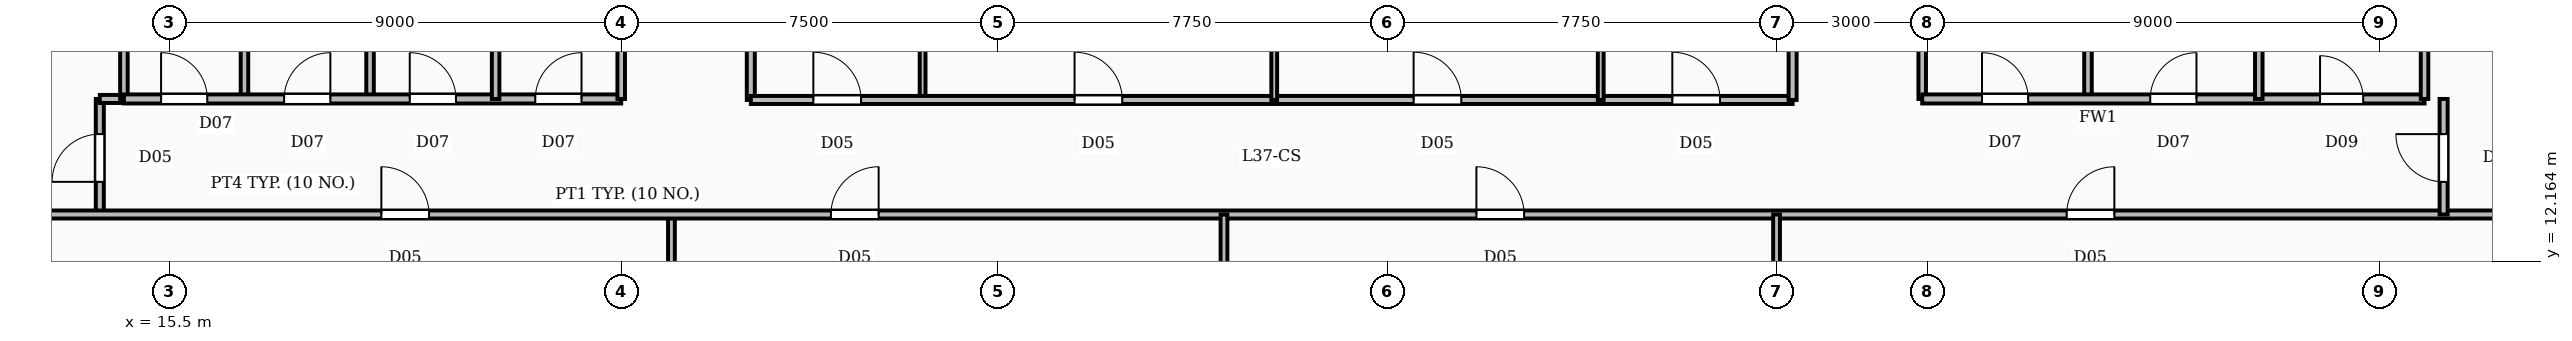
"""IFC4 building model, lengths in metres.
Left out: names, types, materials, properties, quantities, classifications, styles, units other than length and angle.
Written with IfcOpenShell. Run it as: python <this file> out.ifc"""

import sys

from ifc_helpers import new_model, si_unit, direction, frame, frame_2d, origin, place, context, subcontext, project, spatial, rectangle, extrude, element, fill, save


model = new_model("IFC4")
c1 = context("Model", 3, precision=1e-05, world=origin(), true_north=direction((0.0, 1.0)))
c2 = subcontext(c1, "Body", "Model", "MODEL_VIEW")
j1 = project(units=[si_unit("LENGTHUNIT", "METRE"), si_unit("PLANEANGLEUNIT", "RADIAN")], contexts=[c1])
p1 = place(None, origin())
s1 = spatial("IfcSite", under=j1, at=p1, CompositionType="ELEMENT")
p2 = place(p1, origin())
s2 = spatial("IfcBuilding", under=s1, at=p2, CompositionType="ELEMENT")
p3 = place(p2, frame((0.0, 0.0, 158.45)))
s3 = spatial("IfcBuildingStorey", under=s2, at=p3, CompositionType="ELEMENT", Elevation=158.45)
for number, where, z_axis, x_axis in (
    (1, (17.0, 15.4, 0.0), (0.0, 0.0, 1.0), (0.0, 1.0, 0.0)),
    (2, (19.5, 15.4, 0.0), (0.0, 0.0, 1.0), (0.0, 1.0, 0.0)),
    (3, (22.0, 15.4, 0.0), (0.0, 0.0, 1.0), (0.0, 1.0, 0.0)),
):
    element("IfcWall", number, at=place(p3, frame(where, z_axis=z_axis, x_axis=x_axis)), inside=s3, PredefinedType="PARTITIONING", context=c2, shape_type="SweptSolid", body=[
        extrude(rectangle(XDim=3.58, YDim=0.15, at=frame_2d((1.79, 0.0))), origin(), (0.0, 0.0, 1.0), 2.54),
    ])
p4 = place(p3, frame((14.6, 15.4, 0.0), z_axis=(0.0, 0.0, 1.0), x_axis=(1.0, 0.0, 0.0)))
e4 = element("IfcWall", 4, at=p4, inside=s3, PredefinedType="PARTITIONING", context=c2, shape_type="SweptSolid", body=[
    extrude(rectangle(XDim=9.9, YDim=0.18, at=frame_2d((4.95, 0.0))), origin(), (0.0, 0.0, 1.0), 2.54),
])
p5 = place(p4, frame((0.74, 0.0, 0.0)))
e5 = element("IfcOpeningElement", 5, at=p5, cuts=e4, PredefinedType="OPENING", context=c2, shape_type="SweptSolid", body=[
    extrude(rectangle(XDim=0.92, YDim=2.1, at=frame_2d((0.46, 1.05))), frame((0.0, 0.1, 0.0), z_axis=(0.0, -1.0, 0.0), x_axis=(1.0, 0.0, 0.0)), (0.0, 0.0, 1.0), 0.2),
])
p6 = place(p4, frame((3.19, 0.0, 0.0)))
e6 = element("IfcOpeningElement", 6, at=p6, cuts=e4, PredefinedType="OPENING", context=c2, shape_type="SweptSolid", body=[
    extrude(rectangle(XDim=0.92, YDim=2.1, at=frame_2d((0.46, 1.05))), frame((0.0, 0.1, 0.0), z_axis=(0.0, -1.0, 0.0), x_axis=(1.0, 0.0, 0.0)), (0.0, 0.0, 1.0), 0.2),
])
p7 = place(p4, frame((5.69, 0.0, 0.0)))
e7 = element("IfcOpeningElement", 7, at=p7, cuts=e4, PredefinedType="OPENING", context=c2, shape_type="SweptSolid", body=[
    extrude(rectangle(XDim=0.92, YDim=2.1, at=frame_2d((0.46, 1.05))), frame((0.0, 0.1, 0.0), z_axis=(0.0, -1.0, 0.0), x_axis=(1.0, 0.0, 0.0)), (0.0, 0.0, 1.0), 0.2),
])
p8 = place(p4, frame((8.19, 0.0, 0.0)))
e8 = element("IfcOpeningElement", 8, at=p8, cuts=e4, PredefinedType="OPENING", context=c2, shape_type="SweptSolid", body=[
    extrude(rectangle(XDim=0.92, YDim=2.1, at=frame_2d((0.46, 1.05))), frame((0.0, 0.1, 0.0), z_axis=(0.0, -1.0, 0.0), x_axis=(1.0, 0.0, 0.0)), (0.0, 0.0, 1.0), 0.2),
])
for number, where, z_axis, x_axis in (
    (9, (14.6, 15.4, 0.0), (0.0, 0.0, 1.0), (0.0, 1.0, 0.0)),
    (10, (24.5, 15.4, 0.0), (0.0, 0.0, 1.0), (0.0, 1.0, 0.0)),
    (11, (53.7, 15.4, 0.0), (0.0, 0.0, 1.0), (0.0, 1.0, 0.0)),
    (12, (57.1, 15.4, 0.0), (0.0, 0.0, 1.0), (0.0, 1.0, 0.0)),
):
    element("IfcWall", number, at=place(p3, frame(where, z_axis=z_axis, x_axis=x_axis)), inside=s3, PredefinedType="PARTITIONING", context=c2, shape_type="SweptSolid", body=[
        extrude(rectangle(XDim=3.58, YDim=0.15, at=frame_2d((1.79, 0.0))), origin(), (0.0, 0.0, 1.0), 2.54),
    ])
p9 = place(p3, frame((50.4, 15.4, 0.0), z_axis=(0.0, 0.0, 1.0), x_axis=(1.0, 0.0, 0.0)))
e13 = element("IfcWall", 13, at=p9, inside=s3, PredefinedType="SOLIDWALL", context=c2, shape_type="SweptSolid", body=[
    extrude(rectangle(XDim=10.0, YDim=0.18, at=frame_2d((5.0, 0.0))), origin(), (0.0, 0.0, 1.0), 2.54),
])
p10 = place(p9, frame((1.19, 0.0, 0.0)))
e14 = element("IfcOpeningElement", 14, at=p10, cuts=e13, PredefinedType="OPENING", context=c2, shape_type="SweptSolid", body=[
    extrude(rectangle(XDim=0.92, YDim=2.1, at=frame_2d((0.46, 1.05))), frame((0.0, 0.1, 0.0), z_axis=(0.0, -1.0, 0.0), x_axis=(1.0, 0.0, 0.0)), (0.0, 0.0, 1.0), 0.2),
])
p11 = place(p9, frame((4.54, 0.0, 0.0)))
e15 = element("IfcOpeningElement", 15, at=p11, cuts=e13, PredefinedType="OPENING", context=c2, shape_type="SweptSolid", body=[
    extrude(rectangle(XDim=0.92, YDim=2.1, at=frame_2d((0.46, 1.05))), frame((0.0, 0.1, 0.0), z_axis=(0.0, -1.0, 0.0), x_axis=(1.0, 0.0, 0.0)), (0.0, 0.0, 1.0), 0.2),
])
p12 = place(p9, frame((7.92, 0.0, 0.0)))
e16 = element("IfcOpeningElement", 16, at=p12, cuts=e13, PredefinedType="OPENING", context=c2, shape_type="SweptSolid", body=[
    extrude(rectangle(XDim=0.86, YDim=2.05, at=frame_2d((0.43, 1.025))), frame((0.0, 0.1, 0.0), z_axis=(0.0, -1.0, 0.0), x_axis=(1.0, 0.0, 0.0)), (0.0, 0.0, 1.0), 0.2),
])
for number, where, z_axis, x_axis in (
    (17, (50.4, 15.4, 0.0), (0.0, 0.0, 1.0), (0.0, 1.0, 0.0)),
    (18, (60.4, 15.4, 0.0), (0.0, 0.0, 1.0), (0.0, 1.0, 0.0)),
):
    element("IfcWall", number, at=place(p3, frame(where, z_axis=z_axis, x_axis=x_axis)), inside=s3, PredefinedType="PARTITIONING", context=c2, shape_type="SweptSolid", body=[
        extrude(rectangle(XDim=3.58, YDim=0.15, at=frame_2d((1.79, 0.0))), origin(), (0.0, 0.0, 1.0), 2.54),
    ])
p13 = place(p3, frame((25.5, 5.887, 0.0), z_axis=(0.0, 0.0, 1.0), x_axis=(0.0, 1.0, 0.0)))
e19 = element("IfcWall", 19, at=p13, inside=s3, PredefinedType="PARTITIONING", context=c2, shape_type="SweptSolid", body=[
    extrude(rectangle(XDim=7.213, YDim=0.135, at=frame_2d((3.606, 0.0))), origin(), (0.0, 0.0, 1.0), 2.54),
])
p14 = place(p3, frame((36.5, 5.791, 0.0), z_axis=(0.0, 0.0, 1.0), x_axis=(0.0, 1.0, 0.0)))
e20 = element("IfcWall", 20, at=p14, inside=s3, PredefinedType="PARTITIONING", context=c2, shape_type="SweptSolid", body=[
    extrude(rectangle(XDim=7.309, YDim=0.135, at=frame_2d((3.654, 0.0))), origin(), (0.0, 0.0, 1.0), 2.54),
])
p15 = place(p3, frame((47.5, 5.695, 0.0), z_axis=(0.0, 0.0, 1.0), x_axis=(0.0, 1.0, 0.0)))
e21 = element("IfcWall", 21, at=p15, inside=s3, PredefinedType="PARTITIONING", context=c2, shape_type="SweptSolid", body=[
    extrude(rectangle(XDim=7.405, YDim=0.135, at=frame_2d((3.702, 0.0))), origin(), (0.0, 0.0, 1.0), 2.54),
])
p16 = place(p3, frame((5.364, 13.1, 0.0), z_axis=(0.0, 0.0, 1.0), x_axis=(1.0, 0.0, 0.0)))
e22 = element("IfcWall", 22, at=p16, inside=s3, PredefinedType="PARTITIONING", context=c2, shape_type="SweptSolid", body=[
    extrude(rectangle(XDim=60.202, YDim=0.16, at=frame_2d((30.101, 0.0))), origin(), (0.0, 0.0, 1.0), 2.54),
])
p17 = place(p16, frame((14.361, 0.0, 0.0)))
e23 = element("IfcOpeningElement", 23, at=p17, cuts=e22, PredefinedType="OPENING", context=c2, shape_type="SweptSolid", body=[
    extrude(rectangle(XDim=0.95, YDim=2.15, at=frame_2d((0.475, 1.075))), frame((0.0, 0.09, 0.0), z_axis=(0.0, -1.0, 0.0), x_axis=(1.0, 0.0, 0.0)), (0.0, 0.0, 1.0), 0.18),
])
p18 = place(p16, frame((23.311, 0.0, 0.0)))
e24 = element("IfcOpeningElement", 24, at=p18, cuts=e22, PredefinedType="OPENING", context=c2, shape_type="SweptSolid", body=[
    extrude(rectangle(XDim=0.95, YDim=2.15, at=frame_2d((0.475, 1.075))), frame((0.0, 0.09, 0.0), z_axis=(0.0, -1.0, 0.0), x_axis=(1.0, 0.0, 0.0)), (0.0, 0.0, 1.0), 0.18),
])
p19 = place(p16, frame((36.161, 0.0, 0.0)))
e25 = element("IfcOpeningElement", 25, at=p19, cuts=e22, PredefinedType="OPENING", context=c2, shape_type="SweptSolid", body=[
    extrude(rectangle(XDim=0.95, YDim=2.15, at=frame_2d((0.475, 1.075))), frame((0.0, 0.09, 0.0), z_axis=(0.0, -1.0, 0.0), x_axis=(1.0, 0.0, 0.0)), (0.0, 0.0, 1.0), 0.18),
])
p20 = place(p16, frame((47.911, 0.0, 0.0)))
e26 = element("IfcOpeningElement", 26, at=p20, cuts=e22, PredefinedType="OPENING", context=c2, shape_type="SweptSolid", body=[
    extrude(rectangle(XDim=0.95, YDim=2.15, at=frame_2d((0.475, 1.075))), frame((0.0, 0.09, 0.0), z_axis=(0.0, -1.0, 0.0), x_axis=(1.0, 0.0, 0.0)), (0.0, 0.0, 1.0), 0.18),
])
for number, where, z_axis, x_axis in (
    (27, (30.5, 15.38, 0.0), (0.0, 0.0, 1.0), (0.0, 1.0, 0.0)),
    (28, (37.5, 15.38, 0.0), (0.0, 0.0, 1.0), (0.0, 1.0, 0.0)),
    (29, (44.0, 15.38, 0.0), (0.0, 0.0, 1.0), (0.0, 1.0, 0.0)),
):
    element("IfcWall", number, at=place(p3, frame(where, z_axis=z_axis, x_axis=x_axis)), inside=s3, PredefinedType="PARTITIONING", context=c2, shape_type="SweptSolid", body=[
        extrude(rectangle(XDim=20.6, YDim=0.115, at=frame_2d((10.3, 0.0))), origin(), (0.0, 0.0, 1.0), 2.54),
    ])
p21 = place(p3, frame((27.08, 15.38, 0.0), z_axis=(0.0, 0.0, 1.0), x_axis=(1.0, 0.0, 0.0)))
e30 = element("IfcWall", 30, at=p21, inside=s3, PredefinedType="PARTITIONING", context=c2, shape_type="SweptSolid", body=[
    extrude(rectangle(XDim=20.74, YDim=0.16, at=frame_2d((10.37, 0.0))), origin(), (0.0, 0.0, 1.0), 2.54),
])
p22 = place(p21, frame((1.245, 0.0, 0.0)))
e31 = element("IfcOpeningElement", 31, at=p22, cuts=e30, PredefinedType="OPENING", context=c2, shape_type="SweptSolid", body=[
    extrude(rectangle(XDim=0.95, YDim=2.15, at=frame_2d((0.475, 1.075))), frame((0.0, 0.09, 0.0), z_axis=(0.0, -1.0, 0.0), x_axis=(1.0, 0.0, 0.0)), (0.0, 0.0, 1.0), 0.18),
])
p23 = place(p21, frame((6.445, 0.0, 0.0)))
e32 = element("IfcOpeningElement", 32, at=p23, cuts=e30, PredefinedType="OPENING", context=c2, shape_type="SweptSolid", body=[
    extrude(rectangle(XDim=0.95, YDim=2.15, at=frame_2d((0.475, 1.075))), frame((0.0, 0.09, 0.0), z_axis=(0.0, -1.0, 0.0), x_axis=(1.0, 0.0, 0.0)), (0.0, 0.0, 1.0), 0.18),
])
p24 = place(p21, frame((13.195, 0.0, 0.0)))
e33 = element("IfcOpeningElement", 33, at=p24, cuts=e30, PredefinedType="OPENING", context=c2, shape_type="SweptSolid", body=[
    extrude(rectangle(XDim=0.95, YDim=2.15, at=frame_2d((0.475, 1.075))), frame((0.0, 0.09, 0.0), z_axis=(0.0, -1.0, 0.0), x_axis=(1.0, 0.0, 0.0)), (0.0, 0.0, 1.0), 0.18),
])
p25 = place(p21, frame((18.345, 0.0, 0.0)))
e34 = element("IfcOpeningElement", 34, at=p25, cuts=e30, PredefinedType="OPENING", context=c2, shape_type="SweptSolid", body=[
    extrude(rectangle(XDim=0.95, YDim=2.15, at=frame_2d((0.475, 1.075))), frame((0.0, 0.09, 0.0), z_axis=(0.0, -1.0, 0.0), x_axis=(1.0, 0.0, 0.0)), (0.0, 0.0, 1.0), 0.18),
])
for number, where, z_axis, x_axis in (
    (35, (27.08, 15.38, 0.0), (0.0, 0.0, 1.0), (0.0, 1.0, 0.0)),
    (36, (47.82, 15.38, 0.0), (0.0, 0.0, 1.0), (0.0, 1.0, 0.0)),
):
    element("IfcWall", number, at=place(p3, frame(where, z_axis=z_axis, x_axis=x_axis)), inside=s3, PredefinedType="PARTITIONING", context=c2, shape_type="SweptSolid", body=[
        extrude(rectangle(XDim=20.6, YDim=0.16, at=frame_2d((10.3, 0.0))), origin(), (0.0, 0.0, 1.0), 2.54),
    ])
p26 = place(p3, frame((14.12, 13.1, 0.0), z_axis=(0.0, 0.0, 1.0), x_axis=(0.0, 1.0, 0.0)))
e37 = element("IfcWall", 37, at=p26, inside=s3, PredefinedType="PARTITIONING", context=c2, shape_type="SweptSolid", body=[
    extrude(rectangle(XDim=2.3, YDim=0.16, at=frame_2d((1.15, 0.0))), origin(), (0.0, 0.0, 1.0), 2.54),
])
p27 = place(p26, frame((0.65, 0.0, 0.0)))
e38 = element("IfcOpeningElement", 38, at=p27, cuts=e37, PredefinedType="OPENING", context=c2, shape_type="SweptSolid", body=[
    extrude(rectangle(XDim=0.95, YDim=2.15, at=frame_2d((0.475, 1.075))), frame((0.0, 0.09, 0.0), z_axis=(0.0, -1.0, 0.0), x_axis=(1.0, 0.0, 0.0)), (0.0, 0.0, 1.0), 0.18),
])
p28 = place(p3, frame((14.12, 15.4, 0.0), z_axis=(0.0, 0.0, 1.0), x_axis=(1.0, 0.0, 0.0)))
e39 = element("IfcWall", 39, at=p28, inside=s3, PredefinedType="PARTITIONING", context=c2, shape_type="SweptSolid", body=[
    extrude(rectangle(XDim=0.5, YDim=0.16, at=frame_2d((0.25, 0.0))), origin(), (0.0, 0.0, 1.0), 2.54),
])
p29 = place(p3, frame((60.78, 13.1, 0.0), z_axis=(0.0, 0.0, 1.0), x_axis=(0.0, 1.0, 0.0)))
e40 = element("IfcWall", 40, at=p29, inside=s3, PredefinedType="PARTITIONING", context=c2, shape_type="SweptSolid", body=[
    extrude(rectangle(XDim=2.3, YDim=0.16, at=frame_2d((1.15, 0.0))), origin(), (0.0, 0.0, 1.0), 2.54),
])
p30 = place(p29, frame((0.65, 0.0, 0.0)))
e41 = element("IfcOpeningElement", 41, at=p30, cuts=e40, PredefinedType="OPENING", context=c2, shape_type="SweptSolid", body=[
    extrude(rectangle(XDim=0.95, YDim=2.15, at=frame_2d((0.475, 1.075))), frame((0.0, 0.09, 0.0), z_axis=(0.0, -1.0, 0.0), x_axis=(1.0, 0.0, 0.0)), (0.0, 0.0, 1.0), 0.18),
])
p31 = place(p5, origin())
e42 = element("IfcDoor", 42, at=p31, inside=s3, OperationType="SINGLE_SWING_LEFT", PredefinedType="DOOR", context=c2, shape_type="SweptSolid", body=[
    extrude(rectangle(XDim=0.92, YDim=2.1, at=frame_2d((0.46, 1.05))), frame((0.0, 0.025, 0.0), z_axis=(0.0, -1.0, 0.0), x_axis=(1.0, 0.0, 0.0)), (0.0, 0.0, 1.0), 0.05),
])
fill(e5, e42)
p32 = place(p6, origin())
e43 = element("IfcDoor", 43, at=p32, inside=s3, OperationType="SINGLE_SWING_RIGHT", PredefinedType="DOOR", context=c2, shape_type="SweptSolid", body=[
    extrude(rectangle(XDim=0.92, YDim=2.1, at=frame_2d((0.46, 1.05))), frame((0.0, 0.025, 0.0), z_axis=(0.0, -1.0, 0.0), x_axis=(1.0, 0.0, 0.0)), (0.0, 0.0, 1.0), 0.05),
])
fill(e6, e43)
p33 = place(p7, origin())
e44 = element("IfcDoor", 44, at=p33, inside=s3, OperationType="SINGLE_SWING_LEFT", PredefinedType="DOOR", context=c2, shape_type="SweptSolid", body=[
    extrude(rectangle(XDim=0.92, YDim=2.1, at=frame_2d((0.46, 1.05))), frame((0.0, 0.025, 0.0), z_axis=(0.0, -1.0, 0.0), x_axis=(1.0, 0.0, 0.0)), (0.0, 0.0, 1.0), 0.05),
])
fill(e7, e44)
p34 = place(p8, origin())
e45 = element("IfcDoor", 45, at=p34, inside=s3, OperationType="SINGLE_SWING_RIGHT", PredefinedType="DOOR", context=c2, shape_type="SweptSolid", body=[
    extrude(rectangle(XDim=0.92, YDim=2.1, at=frame_2d((0.46, 1.05))), frame((0.0, 0.025, 0.0), z_axis=(0.0, -1.0, 0.0), x_axis=(1.0, 0.0, 0.0)), (0.0, 0.0, 1.0), 0.05),
])
fill(e8, e45)
p35 = place(p10, origin())
e46 = element("IfcDoor", 46, at=p35, inside=s3, OperationType="SINGLE_SWING_LEFT", PredefinedType="DOOR", context=c2, shape_type="SweptSolid", body=[
    extrude(rectangle(XDim=0.92, YDim=2.1, at=frame_2d((0.46, 1.05))), frame((0.0, 0.025, 0.0), z_axis=(0.0, -1.0, 0.0), x_axis=(1.0, 0.0, 0.0)), (0.0, 0.0, 1.0), 0.05),
])
fill(e14, e46)
p36 = place(p11, origin())
e47 = element("IfcDoor", 47, at=p36, inside=s3, OperationType="SINGLE_SWING_RIGHT", PredefinedType="DOOR", context=c2, shape_type="SweptSolid", body=[
    extrude(rectangle(XDim=0.92, YDim=2.1, at=frame_2d((0.46, 1.05))), frame((0.0, 0.025, 0.0), z_axis=(0.0, -1.0, 0.0), x_axis=(1.0, 0.0, 0.0)), (0.0, 0.0, 1.0), 0.05),
])
fill(e15, e47)
p37 = place(p12, origin())
e48 = element("IfcDoor", 48, at=p37, inside=s3, OperationType="SINGLE_SWING_LEFT", PredefinedType="DOOR", context=c2, shape_type="SweptSolid", body=[
    extrude(rectangle(XDim=0.86, YDim=2.05, at=frame_2d((0.43, 1.025))), frame((0.0, 0.025, 0.0), z_axis=(0.0, -1.0, 0.0), x_axis=(1.0, 0.0, 0.0)), (0.0, 0.0, 1.0), 0.05),
])
fill(e16, e48)
p38 = place(p17, origin())
e49 = element("IfcDoor", 49, at=p38, inside=s3, OperationType="SINGLE_SWING_LEFT", PredefinedType="DOOR", context=c2, shape_type="SweptSolid", body=[
    extrude(rectangle(XDim=0.95, YDim=2.15, at=frame_2d((0.475, 1.075))), frame((0.0, 0.025, 0.0), z_axis=(0.0, -1.0, 0.0), x_axis=(1.0, 0.0, 0.0)), (0.0, 0.0, 1.0), 0.05),
])
fill(e23, e49)
p39 = place(p18, origin())
e50 = element("IfcDoor", 50, at=p39, inside=s3, OperationType="SINGLE_SWING_RIGHT", PredefinedType="DOOR", context=c2, shape_type="SweptSolid", body=[
    extrude(rectangle(XDim=0.95, YDim=2.15, at=frame_2d((0.475, 1.075))), frame((0.0, 0.025, 0.0), z_axis=(0.0, -1.0, 0.0), x_axis=(1.0, 0.0, 0.0)), (0.0, 0.0, 1.0), 0.05),
])
fill(e24, e50)
p40 = place(p19, origin())
e51 = element("IfcDoor", 51, at=p40, inside=s3, OperationType="SINGLE_SWING_LEFT", PredefinedType="DOOR", context=c2, shape_type="SweptSolid", body=[
    extrude(rectangle(XDim=0.95, YDim=2.15, at=frame_2d((0.475, 1.075))), frame((0.0, 0.025, 0.0), z_axis=(0.0, -1.0, 0.0), x_axis=(1.0, 0.0, 0.0)), (0.0, 0.0, 1.0), 0.05),
])
fill(e25, e51)
p41 = place(p20, origin())
e52 = element("IfcDoor", 52, at=p41, inside=s3, OperationType="SINGLE_SWING_RIGHT", PredefinedType="DOOR", context=c2, shape_type="SweptSolid", body=[
    extrude(rectangle(XDim=0.95, YDim=2.15, at=frame_2d((0.475, 1.075))), frame((0.0, 0.025, 0.0), z_axis=(0.0, -1.0, 0.0), x_axis=(1.0, 0.0, 0.0)), (0.0, 0.0, 1.0), 0.05),
])
fill(e26, e52)
p42 = place(p22, origin())
e53 = element("IfcDoor", 53, at=p42, inside=s3, OperationType="SINGLE_SWING_LEFT", PredefinedType="DOOR", context=c2, shape_type="SweptSolid", body=[
    extrude(rectangle(XDim=0.95, YDim=2.15, at=frame_2d((0.475, 1.075))), frame((0.0, 0.025, 0.0), z_axis=(0.0, -1.0, 0.0), x_axis=(1.0, 0.0, 0.0)), (0.0, 0.0, 1.0), 0.05),
])
fill(e31, e53)
p43 = place(p23, origin())
e54 = element("IfcDoor", 54, at=p43, inside=s3, OperationType="SINGLE_SWING_LEFT", PredefinedType="DOOR", context=c2, shape_type="SweptSolid", body=[
    extrude(rectangle(XDim=0.95, YDim=2.15, at=frame_2d((0.475, 1.075))), frame((0.0, 0.025, 0.0), z_axis=(0.0, -1.0, 0.0), x_axis=(1.0, 0.0, 0.0)), (0.0, 0.0, 1.0), 0.05),
])
fill(e32, e54)
p44 = place(p24, origin())
e55 = element("IfcDoor", 55, at=p44, inside=s3, OperationType="SINGLE_SWING_LEFT", PredefinedType="DOOR", context=c2, shape_type="SweptSolid", body=[
    extrude(rectangle(XDim=0.95, YDim=2.15, at=frame_2d((0.475, 1.075))), frame((0.0, 0.025, 0.0), z_axis=(0.0, -1.0, 0.0), x_axis=(1.0, 0.0, 0.0)), (0.0, 0.0, 1.0), 0.05),
])
fill(e33, e55)
p45 = place(p25, origin())
e56 = element("IfcDoor", 56, at=p45, inside=s3, OperationType="SINGLE_SWING_LEFT", PredefinedType="DOOR", context=c2, shape_type="SweptSolid", body=[
    extrude(rectangle(XDim=0.95, YDim=2.15, at=frame_2d((0.475, 1.075))), frame((0.0, 0.025, 0.0), z_axis=(0.0, -1.0, 0.0), x_axis=(1.0, 0.0, 0.0)), (0.0, 0.0, 1.0), 0.05),
])
fill(e34, e56)
p46 = place(p27, origin())
e57 = element("IfcDoor", 57, at=p46, inside=s3, OperationType="SINGLE_SWING_LEFT", PredefinedType="DOOR", context=c2, shape_type="SweptSolid", body=[
    extrude(rectangle(XDim=0.95, YDim=2.15, at=frame_2d((0.475, 1.075))), frame((0.0, 0.025, 0.0), z_axis=(0.0, -1.0, 0.0), x_axis=(1.0, 0.0, 0.0)), (0.0, 0.0, 1.0), 0.05),
])
fill(e38, e57)
p47 = place(p30, origin())
e58 = element("IfcDoor", 58, at=p47, inside=s3, OperationType="SINGLE_SWING_RIGHT", PredefinedType="DOOR", context=c2, shape_type="SweptSolid", body=[
    extrude(rectangle(XDim=0.95, YDim=2.15, at=frame_2d((0.475, 1.075))), frame((0.0, 0.025, 0.0), z_axis=(0.0, -1.0, 0.0), x_axis=(1.0, 0.0, 0.0)), (0.0, 0.0, 1.0), 0.05),
])
fill(e41, e58)
save(model, sys.argv[1])
